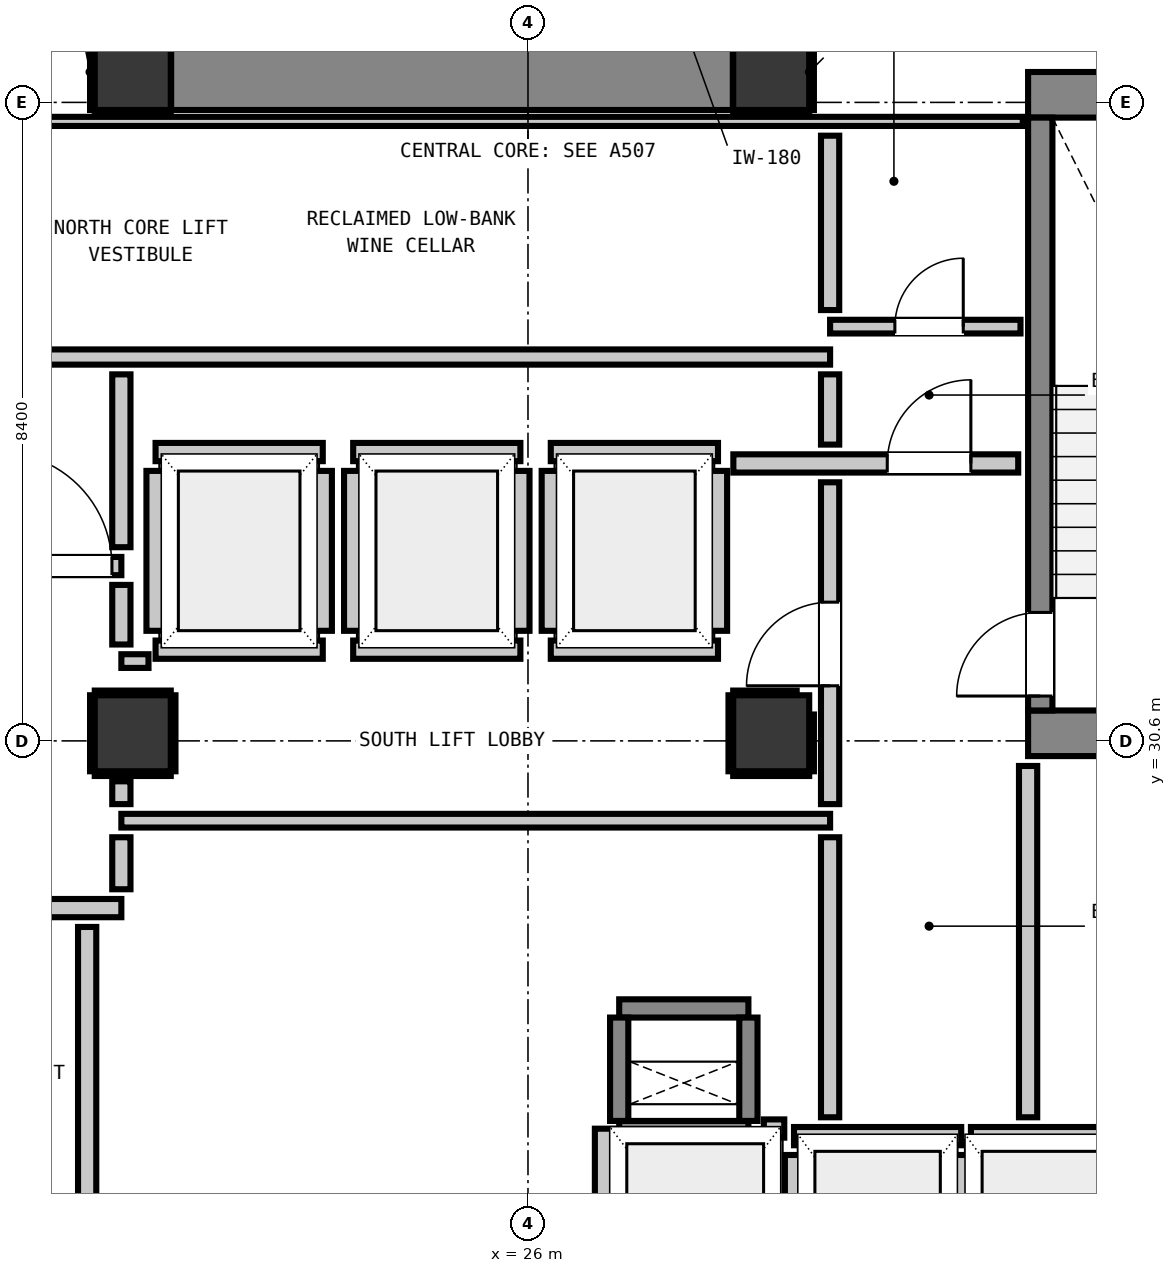
"""IFC4 building model, lengths in metres.
Left out: names, types, materials, properties, quantities, classifications, styles, units other than length and angle.
Written with IfcOpenShell. Run it as: python <this file> out.ifc"""

import sys

from ifc_helpers import new_model, si_unit, direction, frame, frame_2d, origin, origin_2d, place, context, subcontext, project, spatial, rectangle, extrude, element, fill, save


model = new_model("IFC4")
c1 = context("Model", 3, precision=1e-05, world=origin(), true_north=direction((0.0, 1.0)))
c2 = subcontext(c1, "Body", "Model", "MODEL_VIEW")
j1 = project(units=[si_unit("LENGTHUNIT", "METRE"), si_unit("PLANEANGLEUNIT", "RADIAN")], contexts=[c1])
p1 = place(None, origin())
s1 = spatial("IfcSite", under=j1, at=p1, CompositionType="ELEMENT")
p2 = place(p1, origin())
s2 = spatial("IfcBuilding", under=s1, at=p2, CompositionType="ELEMENT")
p3 = place(p2, frame((0.0, 0.0, 132.64)))
s3 = spatial("IfcBuildingStorey", under=s2, at=p3, CompositionType="ELEMENT", Elevation=132.64)
for number, where, z_axis, x_axis in (
    (1, (20.8, 39.4, 0.0), (0.0, 0.0, 1.0), (1.0, 0.0, 0.0)),
    (2, (29.2, 39.4, 0.0), (0.0, 0.0, 1.0), (1.0, 0.0, 0.0)),
):
    element("IfcColumn", number, at=place(p3, frame(where, z_axis=z_axis, x_axis=x_axis)), inside=s3, PredefinedType="COLUMN", context=c2, shape_type="SweptSolid", body=[
        extrude(rectangle(XDim=1.0, YDim=1.0, at=origin_2d()), origin(), (0.0, 0.0, 1.0), 3.32),
    ])
p4 = place(p3, frame((32.58, 39.1, 0.0), z_axis=(0.0, 0.0, 1.0), x_axis=(1.0, 0.0, 0.0)))
e3 = element("IfcWall", 3, at=p4, inside=s3, PredefinedType="SHEAR", context=c2, shape_type="SweptSolid", body=[
    extrude(rectangle(XDim=4.08, YDim=0.6, at=frame_2d((2.04, 0.0))), origin(), (0.0, 0.0, 1.0), 3.32),
])
p5 = place(p3, frame((32.58, 30.7, 0.0), z_axis=(0.0, 0.0, 1.0), x_axis=(1.0, 0.0, 0.0)))
e4 = element("IfcWall", 4, at=p5, inside=s3, PredefinedType="SHEAR", context=c2, shape_type="SweptSolid", body=[
    extrude(rectangle(XDim=3.415, YDim=0.6, at=frame_2d((1.708, 0.0))), origin(), (0.0, 0.0, 1.0), 3.32),
])
p6 = place(p3, frame((21.305, 39.4, 0.0), z_axis=(0.0, 0.0, 1.0), x_axis=(1.0, 0.0, 0.0)))
e5 = element("IfcWall", 5, at=p6, inside=s3, PredefinedType="SHEAR", context=c2, shape_type="SweptSolid", body=[
    extrude(rectangle(XDim=7.39, YDim=1.0, at=frame_2d((3.695, 0.0))), origin(), (0.0, 0.0, 1.0), 3.32),
])
p7 = place(p3, frame((32.74, 31.0, 0.0), z_axis=(0.0, 0.0, 1.0), x_axis=(0.0, 1.0, 0.0)))
e6 = element("IfcWall", 6, at=p7, inside=s3, PredefinedType="SHEAR", context=c2, shape_type="SweptSolid", body=[
    extrude(rectangle(XDim=7.8, YDim=0.32, at=frame_2d((3.9, 0.0))), origin(), (0.0, 0.0, 1.0), 3.32),
])
p8 = place(p7, frame((0.19, 0.0, 0.0)))
e7 = element("IfcOpeningElement", 7, at=p8, cuts=e6, PredefinedType="OPENING", context=c2, shape_type="SweptSolid", body=[
    extrude(rectangle(XDim=1.1, YDim=2.15, at=frame_2d((0.55, 1.075))), frame((0.0, 0.17, 0.0), z_axis=(0.0, -1.0, 0.0), x_axis=(1.0, 0.0, 0.0)), (0.0, 0.0, 1.0), 0.34),
])
for number, where, z_axis, x_axis in (
    (8, (27.2, 25.48, 0.0), (0.0, 0.0, 1.0), (1.0, 0.0, 0.0)),
    (9, (27.2, 27.08, 0.0), (0.0, 0.0, 1.0), (1.0, 0.0, 0.0)),
):
    element("IfcWall", number, at=place(p3, frame(where, z_axis=z_axis, x_axis=x_axis)), inside=s3, PredefinedType="SHEAR", context=c2, shape_type="SweptSolid", body=[
        extrude(rectangle(XDim=1.7, YDim=0.24, at=frame_2d((0.85, 0.0))), origin(), (0.0, 0.0, 1.0), 3.32),
    ])
for number, where, z_axis, x_axis in (
    (10, (27.2, 25.6, 0.0), (0.0, 0.0, 1.0), (0.0, 1.0, 0.0)),
    (11, (28.9, 25.6, 0.0), (0.0, 0.0, 1.0), (0.0, 1.0, 0.0)),
):
    element("IfcWall", number, at=place(p3, frame(where, z_axis=z_axis, x_axis=x_axis)), inside=s3, PredefinedType="SHEAR", context=c2, shape_type="SweptSolid", body=[
        extrude(rectangle(XDim=1.36, YDim=0.24, at=frame_2d((0.68, 0.0))), origin(), (0.0, 0.0, 1.0), 3.32),
    ])
for number, where, z_axis, x_axis in (
    (12, (20.8, 30.7, 0.0), (0.0, 0.0, 1.0), (1.0, 0.0, 0.0)),
    (13, (29.2, 30.7, 0.0), (0.0, 0.0, 1.0), (1.0, 0.0, 0.0)),
):
    element("IfcColumn", number, at=place(p3, frame(where, z_axis=z_axis, x_axis=x_axis)), inside=s3, PredefinedType="COLUMN", context=c2, shape_type="SweptSolid", body=[
        extrude(rectangle(XDim=1.0, YDim=1.0, at=origin_2d()), origin(), (0.0, 0.0, 1.0), 3.32),
    ])
for number, where, z_axis, x_axis in (
    (14, (21.1, 31.8, 0.0), (0.0, 0.0, 1.0), (1.0, 0.0, 0.0)),
    (15, (21.1, 34.4, 0.0), (0.0, 0.0, 1.0), (1.0, 0.0, 0.0)),
):
    element("IfcWall", number, at=place(p3, frame(where, z_axis=z_axis, x_axis=x_axis)), inside=s3, PredefinedType="PARTITIONING", context=c2, shape_type="SweptSolid", body=[
        extrude(rectangle(XDim=2.2, YDim=0.24, at=frame_2d((1.1, 0.0))), origin(), (0.0, 0.0, 1.0), 3.08),
    ])
p9 = place(p3, frame((21.1, 32.048, 0.0), z_axis=(0.0, 0.0, 1.0), x_axis=(0.0, 1.0, 0.0)))
e16 = element("IfcWall", 16, at=p9, inside=s3, PredefinedType="PARTITIONING", context=c2, shape_type="SweptSolid", body=[
    extrude(rectangle(XDim=2.104, YDim=0.24, at=frame_2d((1.052, 0.0))), origin(), (0.0, 0.0, 1.0), 2.315),
])
p10 = place(p3, frame((23.3, 32.048, 0.0), z_axis=(0.0, 0.0, 1.0), x_axis=(0.0, 1.0, 0.0)))
e17 = element("IfcWall", 17, at=p10, inside=s3, PredefinedType="PARTITIONING", context=c2, shape_type="SweptSolid", body=[
    extrude(rectangle(XDim=2.104, YDim=0.24, at=frame_2d((1.052, 0.0))), origin(), (0.0, 0.0, 1.0), 3.08),
])
for number, where, z_axis, x_axis in (
    (18, (23.7, 31.8, 0.0), (0.0, 0.0, 1.0), (1.0, 0.0, 0.0)),
    (19, (23.7, 34.4, 0.0), (0.0, 0.0, 1.0), (1.0, 0.0, 0.0)),
):
    element("IfcWall", number, at=place(p3, frame(where, z_axis=z_axis, x_axis=x_axis)), inside=s3, PredefinedType="PARTITIONING", context=c2, shape_type="SweptSolid", body=[
        extrude(rectangle(XDim=2.2, YDim=0.24, at=frame_2d((1.1, 0.0))), origin(), (0.0, 0.0, 1.0), 3.08),
    ])
for number, where, z_axis, x_axis in (
    (20, (23.7, 32.048, 0.0), (0.0, 0.0, 1.0), (0.0, 1.0, 0.0)),
    (21, (25.9, 32.048, 0.0), (0.0, 0.0, 1.0), (0.0, 1.0, 0.0)),
):
    element("IfcWall", number, at=place(p3, frame(where, z_axis=z_axis, x_axis=x_axis)), inside=s3, PredefinedType="PARTITIONING", context=c2, shape_type="SweptSolid", body=[
        extrude(rectangle(XDim=2.104, YDim=0.24, at=frame_2d((1.052, 0.0))), origin(), (0.0, 0.0, 1.0), 3.08),
    ])
for number, where, z_axis, x_axis in (
    (22, (26.3, 31.8, 0.0), (0.0, 0.0, 1.0), (1.0, 0.0, 0.0)),
    (23, (26.3, 34.4, 0.0), (0.0, 0.0, 1.0), (1.0, 0.0, 0.0)),
):
    element("IfcWall", number, at=place(p3, frame(where, z_axis=z_axis, x_axis=x_axis)), inside=s3, PredefinedType="PARTITIONING", context=c2, shape_type="SweptSolid", body=[
        extrude(rectangle(XDim=2.2, YDim=0.24, at=frame_2d((1.1, 0.0))), origin(), (0.0, 0.0, 1.0), 3.08),
    ])
for number, where, z_axis, x_axis in (
    (24, (26.3, 32.048, 0.0), (0.0, 0.0, 1.0), (0.0, 1.0, 0.0)),
    (25, (28.5, 32.048, 0.0), (0.0, 0.0, 1.0), (0.0, 1.0, 0.0)),
):
    element("IfcWall", number, at=place(p3, frame(where, z_axis=z_axis, x_axis=x_axis)), inside=s3, PredefinedType="PARTITIONING", context=c2, shape_type="SweptSolid", body=[
        extrude(rectangle(XDim=2.104, YDim=0.24, at=frame_2d((1.052, 0.0))), origin(), (0.0, 0.0, 1.0), 3.08),
    ])
p11 = place(p3, frame((29.5, 25.4, 0.0), z_axis=(0.0, 0.0, 1.0), x_axis=(1.0, 0.0, 0.0)))
e26 = element("IfcWall", 26, at=p11, inside=s3, PredefinedType="PARTITIONING", context=c2, shape_type="SweptSolid", body=[
    extrude(rectangle(XDim=2.2, YDim=0.24, at=frame_2d((1.1, 0.0))), origin(), (0.0, 0.0, 1.0), 3.08),
])
p12 = place(p3, frame((29.5, 22.632, 0.0), z_axis=(0.0, 0.0, 1.0), x_axis=(0.0, 1.0, 0.0)))
e27 = element("IfcWall", 27, at=p12, inside=s3, PredefinedType="PARTITIONING", context=c2, shape_type="SweptSolid", body=[
    extrude(rectangle(XDim=2.52, YDim=0.24, at=frame_2d((1.26, 0.0))), origin(), (0.0, 0.0, 1.0), 2.315),
])
p13 = place(p3, frame((31.7, 22.63, 0.0), z_axis=(0.0, 0.0, 1.0), x_axis=(0.0, 1.0, 0.0)))
e28 = element("IfcWall", 28, at=p13, inside=s3, PredefinedType="PARTITIONING", context=c2, shape_type="SweptSolid", body=[
    extrude(rectangle(XDim=2.522, YDim=0.24, at=frame_2d((1.261, 0.0))), origin(), (0.0, 0.0, 1.0), 3.08),
])
p14 = place(p3, frame((31.828, 25.4, 0.0), z_axis=(0.0, 0.0, 1.0), x_axis=(1.0, 0.0, 0.0)))
e29 = element("IfcWall", 29, at=p14, inside=s3, PredefinedType="PARTITIONING", context=c2, shape_type="SweptSolid", body=[
    extrude(rectangle(XDim=2.072, YDim=0.24, at=frame_2d((1.036, 0.0))), origin(), (0.0, 0.0, 1.0), 3.08),
])
p15 = place(p3, frame((29.103, 25.5, 0.0), z_axis=(0.0, 0.0, 1.0), x_axis=(1.0, 0.0, 0.0)))
e30 = element("IfcWall", 30, at=p15, inside=s3, PredefinedType="PARTITIONING", context=c2, shape_type="SweptSolid", body=[
    extrude(rectangle(XDim=0.269, YDim=0.24, at=frame_2d((0.135, 0.0))), origin(), (0.0, 0.0, 1.0), 3.08),
])
p16 = place(p3, frame((27.0, 22.63, 0.0), z_axis=(0.0, 0.0, 1.0), x_axis=(0.0, 1.0, 0.0)))
e31 = element("IfcWall", 31, at=p16, inside=s3, PredefinedType="PARTITIONING", context=c2, shape_type="SweptSolid", body=[
    extrude(rectangle(XDim=2.868, YDim=0.24, at=frame_2d((1.434, 0.0))), origin(), (0.0, 0.0, 1.0), 3.08),
])
p17 = place(p3, frame((17.45, 28.4, 0.0), z_axis=(0.0, 0.0, 1.0), x_axis=(1.0, 0.0, 0.0)))
e32 = element("IfcWall", 32, at=p17, inside=s3, PredefinedType="PARTITIONING", context=c2, shape_type="SweptSolid", body=[
    extrude(rectangle(XDim=3.2, YDim=0.24, at=frame_2d((1.6, 0.0))), origin(), (0.0, 0.0, 1.0), 3.08),
])
p18 = place(p17, frame((0.784, 0.0, 0.0)))
e33 = element("IfcOpeningElement", 33, at=p18, cuts=e32, PredefinedType="OPENING", context=c2, shape_type="SweptSolid", body=[
    extrude(rectangle(XDim=1.1, YDim=2.15, at=frame_2d((0.55, 1.075))), frame((0.0, 0.13, 0.0), z_axis=(0.0, -1.0, 0.0), x_axis=(1.0, 0.0, 0.0)), (0.0, 0.0, 1.0), 0.26),
])
p19 = place(p3, frame((17.45, 32.9, 0.0), z_axis=(0.0, 0.0, 1.0), x_axis=(1.0, 0.0, 0.0)))
e34 = element("IfcWall", 34, at=p19, inside=s3, PredefinedType="PARTITIONING", context=c2, shape_type="SweptSolid", body=[
    extrude(rectangle(XDim=3.2, YDim=0.24, at=frame_2d((1.6, 0.0))), origin(), (0.0, 0.0, 1.0), 3.08),
])
p20 = place(p19, frame((0.159, 0.0, 0.0)))
e35 = element("IfcOpeningElement", 35, at=p20, cuts=e34, PredefinedType="OPENING", context=c2, shape_type="SweptSolid", body=[
    extrude(rectangle(XDim=1.1, YDim=2.15, at=frame_2d((0.55, 1.075))), frame((0.0, 0.13, 0.0), z_axis=(0.0, -1.0, 0.0), x_axis=(1.0, 0.0, 0.0)), (0.0, 0.0, 1.0), 0.26),
])
p21 = place(p19, frame((1.576, 0.0, 0.0)))
e36 = element("IfcOpeningElement", 36, at=p21, cuts=e34, PredefinedType="OPENING", context=c2, shape_type="SweptSolid", body=[
    extrude(rectangle(XDim=1.5, YDim=2.15, at=frame_2d((0.75, 1.075))), frame((0.0, 0.13, 0.0), z_axis=(0.0, -1.0, 0.0), x_axis=(1.0, 0.0, 0.0)), (0.0, 0.0, 1.0), 0.26),
])
p22 = place(p3, frame((28.702, 34.25, 0.0), z_axis=(0.0, 0.0, 1.0), x_axis=(1.0, 0.0, 0.0)))
e37 = element("IfcWall", 37, at=p22, inside=s3, PredefinedType="PARTITIONING", context=c2, shape_type="SweptSolid", body=[
    extrude(rectangle(XDim=3.748, YDim=0.24, at=frame_2d((1.874, 0.0))), origin(), (0.0, 0.0, 1.0), 3.08),
])
p23 = place(p22, frame((2.025, 0.0, 0.0)))
e38 = element("IfcOpeningElement", 38, at=p23, cuts=e37, PredefinedType="OPENING", context=c2, shape_type="SweptSolid", body=[
    extrude(rectangle(XDim=1.1, YDim=2.15, at=frame_2d((0.55, 1.075))), frame((0.0, 0.13, 0.0), z_axis=(0.0, -1.0, 0.0), x_axis=(1.0, 0.0, 0.0)), (0.0, 0.0, 1.0), 0.26),
])
p24 = place(p3, frame((18.95, 35.65, 0.0), z_axis=(0.0, 0.0, 1.0), x_axis=(1.0, 0.0, 0.0)))
e39 = element("IfcWall", 39, at=p24, inside=s3, PredefinedType="PARTITIONING", context=c2, shape_type="SweptSolid", body=[
    extrude(rectangle(XDim=11.025, YDim=0.2, at=frame_2d((5.513, 0.0))), origin(), (0.0, 0.0, 1.0), 3.08),
])
p25 = place(p3, frame((20.65, 29.55, 0.0), z_axis=(0.0, 0.0, 1.0), x_axis=(1.0, 0.0, 0.0)))
e40 = element("IfcWall", 40, at=p25, inside=s3, PredefinedType="PARTITIONING", context=c2, shape_type="SweptSolid", body=[
    extrude(rectangle(XDim=9.325, YDim=0.18, at=frame_2d((4.663, 0.0))), origin(), (0.0, 0.0, 1.0), 3.08),
])
p26 = place(p3, frame((20.65, 31.65, 0.0), z_axis=(0.0, 0.0, 1.0), x_axis=(1.0, 0.0, 0.0)))
e41 = element("IfcWall", 41, at=p26, inside=s3, PredefinedType="PARTITIONING", context=c2, shape_type="SweptSolid", body=[
    extrude(rectangle(XDim=0.357, YDim=0.18, at=frame_2d((0.179, 0.0))), origin(), (0.0, 0.0, 1.0), 3.08),
])
p27 = place(p3, frame((29.975, 36.05, 0.0), z_axis=(0.0, 0.0, 1.0), x_axis=(1.0, 0.0, 0.0)))
e42 = element("IfcWall", 42, at=p27, inside=s3, PredefinedType="PARTITIONING", context=c2, shape_type="SweptSolid", body=[
    extrude(rectangle(XDim=2.505, YDim=0.18, at=frame_2d((1.252, 0.0))), origin(), (0.0, 0.0, 1.0), 3.08),
])
p28 = place(p27, frame((0.852, 0.0, 0.0)))
e43 = element("IfcOpeningElement", 43, at=p28, cuts=e42, PredefinedType="OPENING", context=c2, shape_type="SweptSolid", body=[
    extrude(rectangle(XDim=0.9, YDim=2.1, at=frame_2d((0.45, 1.05))), frame((0.0, 0.1, 0.0), z_axis=(0.0, -1.0, 0.0), x_axis=(1.0, 0.0, 0.0)), (0.0, 0.0, 1.0), 0.2),
])
p29 = place(p3, frame((18.95, 38.75, 0.0), z_axis=(0.0, 0.0, 1.0), x_axis=(1.0, 0.0, 0.0)))
e44 = element("IfcWall", 44, at=p29, inside=s3, PredefinedType="PARTITIONING", context=c2, shape_type="SweptSolid", body=[
    extrude(rectangle(XDim=13.56, YDim=0.12, at=frame_2d((6.78, 0.0))), origin(), (0.0, 0.0, 1.0), 3.08),
])
p30 = place(p3, frame((20.2, 22.586, 0.0), z_axis=(0.0, 0.0, 1.0), x_axis=(0.0, 1.0, 0.0)))
e45 = element("IfcWall", 45, at=p30, inside=s3, PredefinedType="PARTITIONING", context=c2, shape_type="SweptSolid", body=[
    extrude(rectangle(XDim=5.566, YDim=0.24, at=frame_2d((2.783, 0.0))), origin(), (0.0, 0.0, 1.0), 3.08),
])
p31 = place(p3, frame((20.65, 28.648, 0.0), z_axis=(0.0, 0.0, 1.0), x_axis=(0.0, 1.0, 0.0)))
e46 = element("IfcWall", 46, at=p31, inside=s3, PredefinedType="PARTITIONING", context=c2, shape_type="SweptSolid", body=[
    extrude(rectangle(XDim=0.684, YDim=0.24, at=frame_2d((0.342, 0.0))), origin(), (0.0, 0.0, 1.0), 2.315),
])
p32 = place(p3, frame((20.65, 29.768, 0.0), z_axis=(0.0, 0.0, 1.0), x_axis=(0.0, 1.0, 0.0)))
e47 = element("IfcWall", 47, at=p32, inside=s3, PredefinedType="PARTITIONING", context=c2, shape_type="SweptSolid", body=[
    extrude(rectangle(XDim=0.3, YDim=0.24, at=frame_2d((0.15, 0.0))), origin(), (0.0, 0.0, 1.0), 2.315),
])
p33 = place(p3, frame((20.65, 31.868, 0.0), z_axis=(0.0, 0.0, 1.0), x_axis=(0.0, 1.0, 0.0)))
e48 = element("IfcWall", 48, at=p33, inside=s3, PredefinedType="PARTITIONING", context=c2, shape_type="SweptSolid", body=[
    extrude(rectangle(XDim=0.784, YDim=0.24, at=frame_2d((0.392, 0.0))), origin(), (0.0, 0.0, 1.0), 2.315),
])
p34 = place(p3, frame((20.65, 33.148, 0.0), z_axis=(0.0, 0.0, 1.0), x_axis=(0.0, 1.0, 0.0)))
e49 = element("IfcWall", 49, at=p34, inside=s3, PredefinedType="PARTITIONING", context=c2, shape_type="SweptSolid", body=[
    extrude(rectangle(XDim=2.274, YDim=0.24, at=frame_2d((1.137, 0.0))), origin(), (0.0, 0.0, 1.0), 2.315),
])
p35 = place(p3, frame((29.975, 25.648, 0.0), z_axis=(0.0, 0.0, 1.0), x_axis=(0.0, 1.0, 0.0)))
e50 = element("IfcWall", 50, at=p35, inside=s3, PredefinedType="PARTITIONING", context=c2, shape_type="SweptSolid", body=[
    extrude(rectangle(XDim=3.684, YDim=0.24, at=frame_2d((1.842, 0.0))), origin(), (0.0, 0.0, 1.0), 3.08),
])
p36 = place(p3, frame((29.975, 29.768, 0.0), z_axis=(0.0, 0.0, 1.0), x_axis=(0.0, 1.0, 0.0)))
e51 = element("IfcWall", 51, at=p36, inside=s3, PredefinedType="PARTITIONING", context=c2, shape_type="SweptSolid", body=[
    extrude(rectangle(XDim=4.234, YDim=0.24, at=frame_2d((2.117, 0.0))), origin(), (0.0, 0.0, 1.0), 3.08),
])
p37 = place(p36, frame((1.557, 0.0, 0.0)))
e52 = element("IfcOpeningElement", 52, at=p37, cuts=e51, PredefinedType="OPENING", context=c2, shape_type="SweptSolid", body=[
    extrude(rectangle(XDim=1.1, YDim=2.15, at=frame_2d((0.55, 1.075))), frame((0.0, 0.13, 0.0), z_axis=(0.0, -1.0, 0.0), x_axis=(1.0, 0.0, 0.0)), (0.0, 0.0, 1.0), 0.26),
])
p38 = place(p3, frame((29.975, 34.498, 0.0), z_axis=(0.0, 0.0, 1.0), x_axis=(0.0, 1.0, 0.0)))
e53 = element("IfcWall", 53, at=p38, inside=s3, PredefinedType="PARTITIONING", context=c2, shape_type="SweptSolid", body=[
    extrude(rectangle(XDim=0.924, YDim=0.24, at=frame_2d((0.462, 0.0))), origin(), (0.0, 0.0, 1.0), 3.08),
])
p39 = place(p3, frame((29.975, 36.268, 0.0), z_axis=(0.0, 0.0, 1.0), x_axis=(0.0, 1.0, 0.0)))
e54 = element("IfcWall", 54, at=p39, inside=s3, PredefinedType="PARTITIONING", context=c2, shape_type="SweptSolid", body=[
    extrude(rectangle(XDim=2.294, YDim=0.24, at=frame_2d((1.147, 0.0))), origin(), (0.0, 0.0, 1.0), 3.08),
])
p40 = place(p3, frame((32.58, 25.648, 0.0), z_axis=(0.0, 0.0, 1.0), x_axis=(0.0, 1.0, 0.0)))
e55 = element("IfcWall", 55, at=p40, inside=s3, PredefinedType="PARTITIONING", context=c2, shape_type="SweptSolid", body=[
    extrude(rectangle(XDim=4.622, YDim=0.24, at=frame_2d((2.311, 0.0))), origin(), (0.0, 0.0, 1.0), 3.08),
])
for number, where, z_axis, x_axis in (
    (56, (20.3, 38.868, 0.0), (0.0, 0.0, 1.0), (1.0, 0.0, 0.0)),
    (57, (20.268, 38.9, 0.0), (0.0, 0.0, 1.0), (0.0, 1.0, 0.0)),
    (58, (28.7, 38.868, 0.0), (0.0, 0.0, 1.0), (1.0, 0.0, 0.0)),
    (59, (29.732, 38.9, 0.0), (0.0, 0.0, 1.0), (0.0, 1.0, 0.0)),
    (60, (20.3, 30.168, 0.0), (0.0, 0.0, 1.0), (1.0, 0.0, 0.0)),
    (61, (20.3, 31.232, 0.0), (0.0, 0.0, 1.0), (1.0, 0.0, 0.0)),
    (62, (20.268, 30.2, 0.0), (0.0, 0.0, 1.0), (0.0, 1.0, 0.0)),
    (63, (21.332, 30.2, 0.0), (0.0, 0.0, 1.0), (0.0, 1.0, 0.0)),
    (64, (28.7, 30.168, 0.0), (0.0, 0.0, 1.0), (1.0, 0.0, 0.0)),
):
    element("IfcWall", number, at=place(p3, frame(where, z_axis=z_axis, x_axis=x_axis)), inside=s3, PredefinedType="PARTITIONING", context=c2, shape_type="SweptSolid", body=[
        extrude(rectangle(XDim=1.0, YDim=0.06, at=frame_2d((0.5, 0.0))), origin(), (0.0, 0.0, 1.0), 1.45),
    ])
p41 = place(p3, frame((28.7, 31.232, 0.0), z_axis=(0.0, 0.0, 1.0), x_axis=(1.0, 0.0, 0.0)))
e65 = element("IfcWall", 65, at=p41, inside=s3, PredefinedType="PARTITIONING", context=c2, shape_type="SweptSolid", body=[
    extrude(rectangle(XDim=0.835, YDim=0.06, at=frame_2d((0.417, 0.0))), origin(), (0.0, 0.0, 1.0), 1.45),
])
p42 = place(p3, frame((28.668, 30.2, 0.0), z_axis=(0.0, 0.0, 1.0), x_axis=(0.0, 1.0, 0.0)))
e66 = element("IfcWall", 66, at=p42, inside=s3, PredefinedType="PARTITIONING", context=c2, shape_type="SweptSolid", body=[
    extrude(rectangle(XDim=1.0, YDim=0.06, at=frame_2d((0.5, 0.0))), origin(), (0.0, 0.0, 1.0), 1.45),
])
p43 = place(p3, frame((29.732, 30.2, 0.0), z_axis=(0.0, 0.0, 1.0), x_axis=(0.0, 1.0, 0.0)))
e67 = element("IfcWall", 67, at=p43, inside=s3, PredefinedType="PARTITIONING", context=c2, shape_type="SweptSolid", body=[
    extrude(rectangle(XDim=0.747, YDim=0.06, at=frame_2d((0.374, 0.0))), origin(), (0.0, 0.0, 1.0), 1.45),
])
p44 = place(p8, origin())
e68 = element("IfcDoor", 68, at=p44, inside=s3, OperationType="SINGLE_SWING_LEFT", PredefinedType="DOOR", context=c2, shape_type="SweptSolid", body=[
    extrude(rectangle(XDim=1.1, YDim=2.15, at=frame_2d((0.55, 1.075))), frame((0.0, 0.025, 0.0), z_axis=(0.0, -1.0, 0.0), x_axis=(1.0, 0.0, 0.0)), (0.0, 0.0, 1.0), 0.05),
])
fill(e7, e68)
p45 = place(p37, origin())
e69 = element("IfcDoor", 69, at=p45, inside=s3, OperationType="SINGLE_SWING_LEFT", PredefinedType="DOOR", context=c2, shape_type="SweptSolid", body=[
    extrude(rectangle(XDim=1.1, YDim=2.15, at=frame_2d((0.55, 1.075))), frame((0.0, 0.025, 0.0), z_axis=(0.0, -1.0, 0.0), x_axis=(1.0, 0.0, 0.0)), (0.0, 0.0, 1.0), 0.05),
])
fill(e52, e69)
p46 = place(p23, origin())
e70 = element("IfcDoor", 70, at=p46, inside=s3, OperationType="SINGLE_SWING_RIGHT", PredefinedType="DOOR", context=c2, shape_type="SweptSolid", body=[
    extrude(rectangle(XDim=1.1, YDim=2.15, at=frame_2d((0.55, 1.075))), frame((0.0, 0.025, 0.0), z_axis=(0.0, -1.0, 0.0), x_axis=(1.0, 0.0, 0.0)), (0.0, 0.0, 1.0), 0.05),
])
fill(e38, e70)
p47 = place(p21, origin())
e71 = element("IfcDoor", 71, at=p47, inside=s3, OperationType="SINGLE_SWING_LEFT", PredefinedType="DOOR", context=c2, shape_type="SweptSolid", body=[
    extrude(rectangle(XDim=1.5, YDim=2.15, at=frame_2d((0.75, 1.075))), frame((0.0, 0.025, 0.0), z_axis=(0.0, -1.0, 0.0), x_axis=(1.0, 0.0, 0.0)), (0.0, 0.0, 1.0), 0.05),
])
fill(e36, e71)
p48 = place(p28, origin())
e72 = element("IfcDoor", 72, at=p48, inside=s3, OperationType="SINGLE_SWING_RIGHT", PredefinedType="DOOR", context=c2, shape_type="SweptSolid", body=[
    extrude(rectangle(XDim=0.9, YDim=2.1, at=frame_2d((0.45, 1.05))), frame((0.0, 0.025, 0.0), z_axis=(0.0, -1.0, 0.0), x_axis=(1.0, 0.0, 0.0)), (0.0, 0.0, 1.0), 0.05),
])
fill(e43, e72)
save(model, sys.argv[1])
